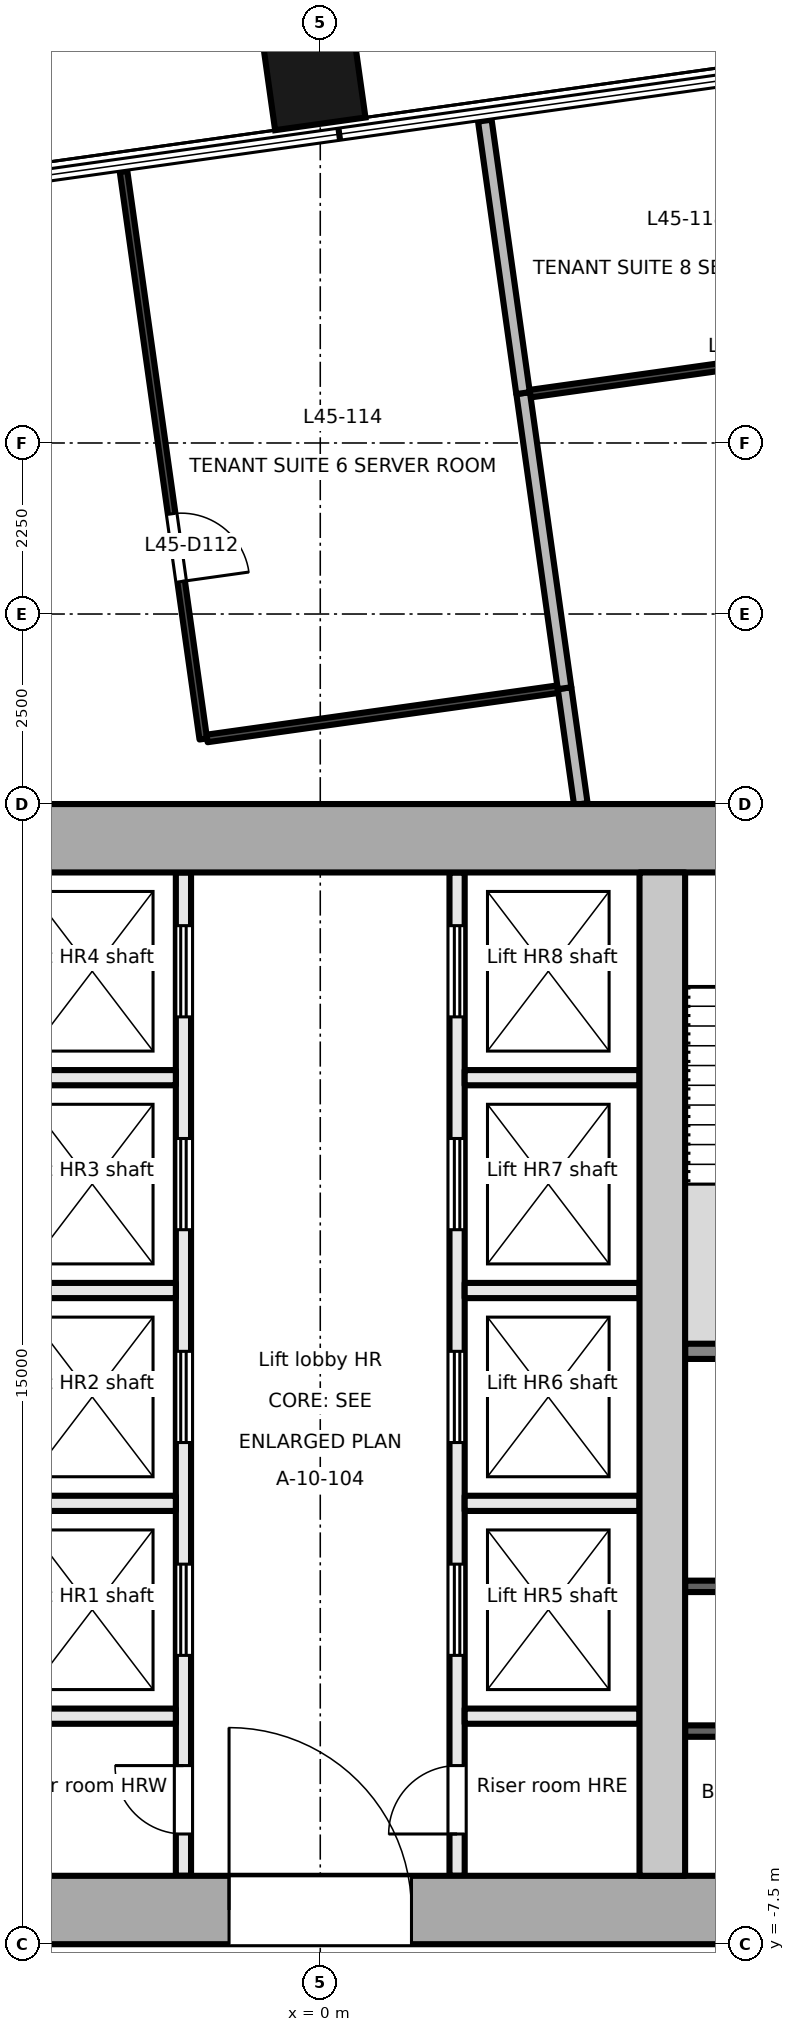
"""IFC4 building model, lengths in metres.
Left out: names, types, materials, properties, quantities, classifications, styles, units other than length and angle.
Written with IfcOpenShell. Run it as: python <this file> out.ifc"""

import sys

from ifc_helpers import new_model, si_unit, direction, frame, frame_2d, origin, origin_2d, place, context, subcontext, project, spatial, rectangle, extrude, element, fill, save


model = new_model("IFC4")
c1 = context("Model", 3, precision=1e-05, world=origin(), true_north=direction((0.0, 1.0)))
c2 = subcontext(c1, "Body", "Model", "MODEL_VIEW")
j1 = project(units=[si_unit("LENGTHUNIT", "METRE"), si_unit("PLANEANGLEUNIT", "RADIAN")], contexts=[c1])
p1 = place(None, origin())
s1 = spatial("IfcSite", under=j1, at=p1, CompositionType="ELEMENT")
p2 = place(p1, origin())
s2 = spatial("IfcBuilding", under=s1, at=p2, CompositionType="ELEMENT")
p3 = place(p2, frame((0.0, 0.0, 195.8)))
s3 = spatial("IfcBuildingStorey", under=s2, at=p3, CompositionType="ELEMENT", Elevation=195.8)
p4 = place(p3, frame((-0.125, 17.34, -0.2), z_axis=(0.0, 0.0, 1.0), x_axis=(0.99027049762, 0.139155817501, 0.0)))
e1 = element("IfcColumn", 1, at=p4, inside=s3, PredefinedType="COLUMN", context=c2, shape_type="SweptSolid", body=[
    extrude(rectangle(XDim=1.2, YDim=1.8, at=origin_2d()), origin(), (0.0, 0.0, 1.0), 3.9),
])
p5 = place(p3, frame((-18.0, -7.05, -0.2), z_axis=(0.0, 0.0, 1.0), x_axis=(1.0, 0.0, 0.0)))
e2 = element("IfcWall", 2, at=p5, inside=s3, PredefinedType="SHEAR", context=c2, shape_type="SweptSolid", body=[
    extrude(rectangle(XDim=36.0, YDim=0.9, at=frame_2d((18.0, 0.0))), origin(), (0.0, 0.0, 1.0), 3.9),
])
p6 = place(p5, frame((8.1, 0.0, 0.2)))
e3 = element("IfcOpeningElement", 3, at=p6, cuts=e2, PredefinedType="OPENING", context=c2, shape_type="SweptSolid", body=[
    extrude(rectangle(XDim=1.8, YDim=2.1, at=frame_2d((0.9, 1.05))), frame((0.0, 0.46, 0.0), z_axis=(0.0, -1.0, 0.0), x_axis=(1.0, 0.0, 0.0)), (0.0, 0.0, 1.0), 0.921),
])
p7 = place(p5, frame((16.8, 0.0, 0.2)))
e4 = element("IfcOpeningElement", 4, at=p7, cuts=e2, PredefinedType="OPENING", context=c2, shape_type="SweptSolid", body=[
    extrude(rectangle(XDim=2.4, YDim=2.1, at=frame_2d((1.2, 1.05))), frame((0.0, 0.46, 0.0), z_axis=(0.0, -1.0, 0.0), x_axis=(1.0, 0.0, 0.0)), (0.0, 0.0, 1.0), 0.921),
])
p8 = place(p5, frame((26.1, 0.0, 0.2)))
e5 = element("IfcOpeningElement", 5, at=p8, cuts=e2, PredefinedType="OPENING", context=c2, shape_type="SweptSolid", body=[
    extrude(rectangle(XDim=2.4, YDim=2.1, at=frame_2d((1.2, 1.05))), frame((0.0, 0.46, 0.0), z_axis=(0.0, -1.0, 0.0), x_axis=(1.0, 0.0, 0.0)), (0.0, 0.0, 1.0), 0.921),
])
p9 = place(p3, frame((-18.0, 7.05, -0.2), z_axis=(0.0, 0.0, 1.0), x_axis=(1.0, 0.0, 0.0)))
e6 = element("IfcWall", 6, at=p9, inside=s3, PredefinedType="SHEAR", context=c2, shape_type="SweptSolid", body=[
    extrude(rectangle(XDim=36.0, YDim=0.9, at=frame_2d((18.0, 0.0))), origin(), (0.0, 0.0, 1.0), 3.9),
])
p10 = place(p3, frame((4.5, -6.6, -0.2), z_axis=(0.0, 0.0, 1.0), x_axis=(0.0, 1.0, 0.0)))
e7 = element("IfcWall", 7, at=p10, inside=s3, PredefinedType="SHEAR", context=c2, shape_type="SweptSolid", body=[
    extrude(rectangle(XDim=13.2, YDim=0.6, at=frame_2d((6.6, 0.0))), origin(), (0.0, 0.0, 1.0), 3.9),
])
p11 = place(p3, frame((-1.8, -6.6, 0.0), z_axis=(0.0, 0.0, 1.0), x_axis=(0.0, 1.0, 0.0)))
e8 = element("IfcWall", 8, at=p11, inside=s3, PredefinedType="PARTITIONING", context=c2, shape_type="SweptSolid", body=[
    extrude(rectangle(XDim=13.2, YDim=0.2, at=frame_2d((6.6, 0.0))), origin(), (0.0, 0.0, 1.0), 3.7),
])
p12 = place(p11, frame((0.55, 0.0, 0.0)))
e9 = element("IfcOpeningElement", 9, at=p12, cuts=e8, PredefinedType="OPENING", context=c2, shape_type="SweptSolid", body=[
    extrude(rectangle(XDim=0.9, YDim=2.1, at=frame_2d((0.45, 1.05))), frame((0.0, 0.111, 0.0), z_axis=(0.0, -1.0, 0.0), x_axis=(1.0, 0.0, 0.0)), (0.0, 0.0, 1.0), 0.221),
])
p13 = place(p11, frame((2.9, 0.0, 0.0)))
e10 = element("IfcOpeningElement", 10, at=p13, cuts=e8, PredefinedType="OPENING", context=c2, shape_type="SweptSolid", body=[
    extrude(rectangle(XDim=1.2, YDim=2.1, at=frame_2d((0.6, 1.05))), frame((0.0, 0.111, 0.0), z_axis=(0.0, -1.0, 0.0), x_axis=(1.0, 0.0, 0.0)), (0.0, 0.0, 1.0), 0.221),
])
p14 = place(p11, frame((5.7, 0.0, 0.0)))
e11 = element("IfcOpeningElement", 11, at=p14, cuts=e8, PredefinedType="OPENING", context=c2, shape_type="SweptSolid", body=[
    extrude(rectangle(XDim=1.2, YDim=2.1, at=frame_2d((0.6, 1.05))), frame((0.0, 0.111, 0.0), z_axis=(0.0, -1.0, 0.0), x_axis=(1.0, 0.0, 0.0)), (0.0, 0.0, 1.0), 0.221),
])
p15 = place(p11, frame((8.5, 0.0, 0.0)))
e12 = element("IfcOpeningElement", 12, at=p15, cuts=e8, PredefinedType="OPENING", context=c2, shape_type="SweptSolid", body=[
    extrude(rectangle(XDim=1.2, YDim=2.1, at=frame_2d((0.6, 1.05))), frame((0.0, 0.111, 0.0), z_axis=(0.0, -1.0, 0.0), x_axis=(1.0, 0.0, 0.0)), (0.0, 0.0, 1.0), 0.221),
])
p16 = place(p11, frame((11.3, 0.0, 0.0)))
e13 = element("IfcOpeningElement", 13, at=p16, cuts=e8, PredefinedType="OPENING", context=c2, shape_type="SweptSolid", body=[
    extrude(rectangle(XDim=1.2, YDim=2.1, at=frame_2d((0.6, 1.05))), frame((0.0, 0.111, 0.0), z_axis=(0.0, -1.0, 0.0), x_axis=(1.0, 0.0, 0.0)), (0.0, 0.0, 1.0), 0.221),
])
p17 = place(p3, frame((1.8, -6.6, 0.0), z_axis=(0.0, 0.0, 1.0), x_axis=(0.0, 1.0, 0.0)))
e14 = element("IfcWall", 14, at=p17, inside=s3, PredefinedType="PARTITIONING", context=c2, shape_type="SweptSolid", body=[
    extrude(rectangle(XDim=13.2, YDim=0.2, at=frame_2d((6.6, 0.0))), origin(), (0.0, 0.0, 1.0), 3.7),
])
p18 = place(p17, frame((0.55, 0.0, 0.0)))
e15 = element("IfcOpeningElement", 15, at=p18, cuts=e14, PredefinedType="OPENING", context=c2, shape_type="SweptSolid", body=[
    extrude(rectangle(XDim=0.9, YDim=2.1, at=frame_2d((0.45, 1.05))), frame((0.0, 0.111, 0.0), z_axis=(0.0, -1.0, 0.0), x_axis=(1.0, 0.0, 0.0)), (0.0, 0.0, 1.0), 0.221),
])
p19 = place(p17, frame((2.9, 0.0, 0.0)))
e16 = element("IfcOpeningElement", 16, at=p19, cuts=e14, PredefinedType="OPENING", context=c2, shape_type="SweptSolid", body=[
    extrude(rectangle(XDim=1.2, YDim=2.1, at=frame_2d((0.6, 1.05))), frame((0.0, 0.111, 0.0), z_axis=(0.0, -1.0, 0.0), x_axis=(1.0, 0.0, 0.0)), (0.0, 0.0, 1.0), 0.221),
])
p20 = place(p17, frame((5.7, 0.0, 0.0)))
e17 = element("IfcOpeningElement", 17, at=p20, cuts=e14, PredefinedType="OPENING", context=c2, shape_type="SweptSolid", body=[
    extrude(rectangle(XDim=1.2, YDim=2.1, at=frame_2d((0.6, 1.05))), frame((0.0, 0.111, 0.0), z_axis=(0.0, -1.0, 0.0), x_axis=(1.0, 0.0, 0.0)), (0.0, 0.0, 1.0), 0.221),
])
p21 = place(p17, frame((8.5, 0.0, 0.0)))
e18 = element("IfcOpeningElement", 18, at=p21, cuts=e14, PredefinedType="OPENING", context=c2, shape_type="SweptSolid", body=[
    extrude(rectangle(XDim=1.2, YDim=2.1, at=frame_2d((0.6, 1.05))), frame((0.0, 0.111, 0.0), z_axis=(0.0, -1.0, 0.0), x_axis=(1.0, 0.0, 0.0)), (0.0, 0.0, 1.0), 0.221),
])
p22 = place(p17, frame((11.3, 0.0, 0.0)))
e19 = element("IfcOpeningElement", 19, at=p22, cuts=e14, PredefinedType="OPENING", context=c2, shape_type="SweptSolid", body=[
    extrude(rectangle(XDim=1.2, YDim=2.1, at=frame_2d((0.6, 1.05))), frame((0.0, 0.111, 0.0), z_axis=(0.0, -1.0, 0.0), x_axis=(1.0, 0.0, 0.0)), (0.0, 0.0, 1.0), 0.221),
])
for number, where, z_axis, x_axis in (
    (20, (-4.2, -1.7, 0.0), (0.0, 0.0, 1.0), (1.0, 0.0, 0.0)),
    (21, (-4.2, 1.1, 0.0), (0.0, 0.0, 1.0), (1.0, 0.0, 0.0)),
    (22, (-4.2, 3.9, 0.0), (0.0, 0.0, 1.0), (1.0, 0.0, 0.0)),
    (23, (-4.2, -4.5, 0.0), (0.0, 0.0, 1.0), (1.0, 0.0, 0.0)),
    (24, (1.9, -1.7, 0.0), (0.0, 0.0, 1.0), (1.0, 0.0, 0.0)),
    (25, (1.9, 1.1, 0.0), (0.0, 0.0, 1.0), (1.0, 0.0, 0.0)),
    (26, (1.9, 3.9, 0.0), (0.0, 0.0, 1.0), (1.0, 0.0, 0.0)),
    (27, (1.9, -4.5, 0.0), (0.0, 0.0, 1.0), (1.0, 0.0, 0.0)),
):
    element("IfcWall", number, at=place(p3, frame(where, z_axis=z_axis, x_axis=x_axis)), inside=s3, PredefinedType="PARTITIONING", context=c2, shape_type="SweptSolid", body=[
        extrude(rectangle(XDim=2.3, YDim=0.2, at=frame_2d((1.15, 0.0))), origin(), (0.0, 0.0, 1.0), 3.7),
    ])
p23 = place(p3, frame((4.8, 0.3, 0.0), z_axis=(0.0, 0.0, 1.0), x_axis=(1.0, 0.0, 0.0)))
e28 = element("IfcWall", 28, at=p23, inside=s3, PredefinedType="PARTITIONING", context=c2, shape_type="SweptSolid", body=[
    extrude(rectangle(XDim=3.15, YDim=0.2, at=frame_2d((1.575, 0.0))), origin(), (0.0, 0.0, 1.0), 3.7),
])
for number, where, z_axis, x_axis in (
    (29, (4.8, -4.696, 0.0), (0.0, 0.0, 1.0), (1.0, 0.0, 0.0)),
    (30, (4.8, -2.792, 0.0), (0.0, 0.0, 1.0), (1.0, 0.0, 0.0)),
):
    element("IfcWall", number, at=place(p3, frame(where, z_axis=z_axis, x_axis=x_axis)), inside=s3, PredefinedType="PARTITIONING", context=c2, shape_type="SweptSolid", body=[
        extrude(rectangle(XDim=3.15, YDim=0.15, at=frame_2d((1.575, 0.0))), origin(), (0.0, 0.0, 1.0), 3.7),
    ])
p24 = place(p3, frame((-2.588, 15.822, 0.0), z_axis=(0.0, 0.0, 1.0), x_axis=(0.139113424861, -0.990276453837, 0.0)))
e31 = element("IfcWall", 31, at=p24, inside=s3, PredefinedType="PARTITIONING", context=c2, shape_type="SweptSolid", body=[
    extrude(rectangle(XDim=7.539, YDim=0.1, at=frame_2d((3.77, 0.0))), origin(), (0.0, 0.0, 1.0), 3.7),
])
p25 = place(p24, frame((4.548, 0.0, 0.0)))
e32 = element("IfcOpeningElement", 32, at=p25, cuts=e31, PredefinedType="OPENING", context=c2, shape_type="SweptSolid", body=[
    extrude(rectangle(XDim=0.9, YDim=2.1, at=frame_2d((0.45, 1.05))), frame((0.0, 0.061, 0.0), z_axis=(0.0, -1.0, 0.0), x_axis=(1.0, 0.0, 0.0)), (0.0, 0.0, 1.0), 0.121),
])
p26 = place(p3, frame((-1.489, 8.363, 0.0), z_axis=(0.0, 0.0, 1.0), x_axis=(0.990283092648, 0.139066158415, 0.0)))
e33 = element("IfcWall", 33, at=p26, inside=s3, PredefinedType="PARTITIONING", context=c2, shape_type="SweptSolid", body=[
    extrude(rectangle(XDim=4.659, YDim=0.1, at=frame_2d((2.33, 0.0))), origin(), (0.0, 0.0, 1.0), 3.25),
])
p27 = place(p3, frame((3.214, 9.024, 0.0), z_axis=(0.0, 0.0, 1.0), x_axis=(0.138977710078, -0.990295509483, 0.0)))
e34 = element("IfcWall", 34, at=p27, inside=s3, PredefinedType="PARTITIONING", context=c2, shape_type="SweptSolid", body=[
    extrude(rectangle(XDim=1.539, YDim=0.18, at=frame_2d((0.77, 0.0))), origin(), (0.0, 0.0, 1.0), 3.7),
])
p28 = place(p3, frame((2.669, 12.906, 0.0), z_axis=(0.0, 0.0, 1.0), x_axis=(0.139066846741, -0.990282995985, 0.0)))
e35 = element("IfcWall", 35, at=p28, inside=s3, PredefinedType="PARTITIONING", context=c2, shape_type="SweptSolid", body=[
    extrude(rectangle(XDim=3.92, YDim=0.18, at=frame_2d((1.96, 0.0))), origin(), (0.0, 0.0, 1.0), 3.7),
])
p29 = place(p3, frame((2.165, 16.491, 0.0), z_axis=(0.0, 0.0, 1.0), x_axis=(0.138928291597, -0.990302443597, 0.0)))
e36 = element("IfcWall", 36, at=p29, inside=s3, PredefinedType="PARTITIONING", context=c2, shape_type="SweptSolid", body=[
    extrude(rectangle(XDim=3.62, YDim=0.18, at=frame_2d((1.81, 0.0))), origin(), (0.0, 0.0, 1.0), 3.7),
])
p30 = place(p3, frame((2.761, 12.899, 0.0), z_axis=(0.0, 0.0, 1.0), x_axis=(0.990277569518, 0.139105482671, 0.0)))
e37 = element("IfcWall", 37, at=p30, inside=s3, PredefinedType="PARTITIONING", context=c2, shape_type="SweptSolid", body=[
    extrude(rectangle(XDim=4.709, YDim=0.1, at=frame_2d((2.354, 0.0))), origin(), (0.0, 0.0, 1.0), 3.25),
])
p31 = place(p30, frame((2.566, 0.0, 0.0)))
e38 = element("IfcOpeningElement", 38, at=p31, cuts=e37, PredefinedType="OPENING", context=c2, shape_type="SweptSolid", body=[
    extrude(rectangle(XDim=0.9, YDim=2.1, at=frame_2d((0.45, 1.05))), frame((0.0, 0.061, 0.0), z_axis=(0.0, -1.0, 0.0), x_axis=(1.0, 0.0, 0.0)), (0.0, 0.0, 1.0), 0.121),
])
p32 = place(p12, origin())
e39 = element("IfcDoor", 39, at=p32, inside=s3, OperationType="SINGLE_SWING_RIGHT", PredefinedType="DOOR", context=c2, shape_type="SweptSolid", body=[
    extrude(rectangle(XDim=0.9, YDim=2.1, at=frame_2d((0.45, 1.05))), frame((0.0, 0.025, 0.0), z_axis=(0.0, -1.0, 0.0), x_axis=(1.0, 0.0, 0.0)), (0.0, 0.0, 1.0), 0.05),
])
fill(e9, e39)
p33 = place(p13, origin())
e40 = element("IfcDoor", 40, at=p33, inside=s3, OperationType="DOUBLE_DOOR_SLIDING", PredefinedType="DOOR", context=c2, shape_type="SweptSolid", body=[
    extrude(rectangle(XDim=1.2, YDim=2.1, at=frame_2d((0.6, 1.05))), frame((0.0, 0.025, 0.0), z_axis=(0.0, -1.0, 0.0), x_axis=(1.0, 0.0, 0.0)), (0.0, 0.0, 1.0), 0.05),
])
fill(e10, e40)
p34 = place(p14, origin())
e41 = element("IfcDoor", 41, at=p34, inside=s3, OperationType="DOUBLE_DOOR_SLIDING", PredefinedType="DOOR", context=c2, shape_type="SweptSolid", body=[
    extrude(rectangle(XDim=1.2, YDim=2.1, at=frame_2d((0.6, 1.05))), frame((0.0, 0.025, 0.0), z_axis=(0.0, -1.0, 0.0), x_axis=(1.0, 0.0, 0.0)), (0.0, 0.0, 1.0), 0.05),
])
fill(e11, e41)
p35 = place(p15, origin())
e42 = element("IfcDoor", 42, at=p35, inside=s3, OperationType="DOUBLE_DOOR_SLIDING", PredefinedType="DOOR", context=c2, shape_type="SweptSolid", body=[
    extrude(rectangle(XDim=1.2, YDim=2.1, at=frame_2d((0.6, 1.05))), frame((0.0, 0.025, 0.0), z_axis=(0.0, -1.0, 0.0), x_axis=(1.0, 0.0, 0.0)), (0.0, 0.0, 1.0), 0.05),
])
fill(e12, e42)
p36 = place(p16, origin())
e43 = element("IfcDoor", 43, at=p36, inside=s3, OperationType="DOUBLE_DOOR_SLIDING", PredefinedType="DOOR", context=c2, shape_type="SweptSolid", body=[
    extrude(rectangle(XDim=1.2, YDim=2.1, at=frame_2d((0.6, 1.05))), frame((0.0, 0.025, 0.0), z_axis=(0.0, -1.0, 0.0), x_axis=(1.0, 0.0, 0.0)), (0.0, 0.0, 1.0), 0.05),
])
fill(e13, e43)
p37 = place(p18, origin())
e44 = element("IfcDoor", 44, at=p37, inside=s3, OperationType="SINGLE_SWING_LEFT", PredefinedType="DOOR", context=c2, shape_type="SweptSolid", body=[
    extrude(rectangle(XDim=0.9, YDim=2.1, at=frame_2d((0.45, 1.05))), frame((0.0, 0.025, 0.0), z_axis=(0.0, -1.0, 0.0), x_axis=(1.0, 0.0, 0.0)), (0.0, 0.0, 1.0), 0.05),
])
fill(e15, e44)
p38 = place(p19, origin())
e45 = element("IfcDoor", 45, at=p38, inside=s3, OperationType="DOUBLE_DOOR_SLIDING", PredefinedType="DOOR", context=c2, shape_type="SweptSolid", body=[
    extrude(rectangle(XDim=1.2, YDim=2.1, at=frame_2d((0.6, 1.05))), frame((0.0, 0.025, 0.0), z_axis=(0.0, -1.0, 0.0), x_axis=(1.0, 0.0, 0.0)), (0.0, 0.0, 1.0), 0.05),
])
fill(e16, e45)
p39 = place(p20, origin())
e46 = element("IfcDoor", 46, at=p39, inside=s3, OperationType="DOUBLE_DOOR_SLIDING", PredefinedType="DOOR", context=c2, shape_type="SweptSolid", body=[
    extrude(rectangle(XDim=1.2, YDim=2.1, at=frame_2d((0.6, 1.05))), frame((0.0, 0.025, 0.0), z_axis=(0.0, -1.0, 0.0), x_axis=(1.0, 0.0, 0.0)), (0.0, 0.0, 1.0), 0.05),
])
fill(e17, e46)
p40 = place(p21, origin())
e47 = element("IfcDoor", 47, at=p40, inside=s3, OperationType="DOUBLE_DOOR_SLIDING", PredefinedType="DOOR", context=c2, shape_type="SweptSolid", body=[
    extrude(rectangle(XDim=1.2, YDim=2.1, at=frame_2d((0.6, 1.05))), frame((0.0, 0.025, 0.0), z_axis=(0.0, -1.0, 0.0), x_axis=(1.0, 0.0, 0.0)), (0.0, 0.0, 1.0), 0.05),
])
fill(e18, e47)
p41 = place(p22, origin())
e48 = element("IfcDoor", 48, at=p41, inside=s3, OperationType="DOUBLE_DOOR_SLIDING", PredefinedType="DOOR", context=c2, shape_type="SweptSolid", body=[
    extrude(rectangle(XDim=1.2, YDim=2.1, at=frame_2d((0.6, 1.05))), frame((0.0, 0.025, 0.0), z_axis=(0.0, -1.0, 0.0), x_axis=(1.0, 0.0, 0.0)), (0.0, 0.0, 1.0), 0.05),
])
fill(e19, e48)
p42 = place(p7, origin())
e49 = element("IfcDoor", 49, at=p42, inside=s3, OperationType="DOUBLE_DOOR_DOUBLE_SWING", PredefinedType="DOOR", context=c2, shape_type="SweptSolid", body=[
    extrude(rectangle(XDim=2.4, YDim=2.1, at=frame_2d((1.2, 1.05))), frame((0.0, 0.025, 0.0), z_axis=(0.0, -1.0, 0.0), x_axis=(1.0, 0.0, 0.0)), (0.0, 0.0, 1.0), 0.05),
])
fill(e4, e49)
p43 = place(p25, origin())
e50 = element("IfcDoor", 50, at=p43, inside=s3, OperationType="SINGLE_SWING_RIGHT", PredefinedType="DOOR", context=c2, shape_type="SweptSolid", body=[
    extrude(rectangle(XDim=0.9, YDim=2.1, at=frame_2d((0.45, 1.05))), frame((0.0, 0.025, 0.0), z_axis=(0.0, -1.0, 0.0), x_axis=(1.0, 0.0, 0.0)), (0.0, 0.0, 1.0), 0.05),
])
fill(e32, e50)
save(model, sys.argv[1])
